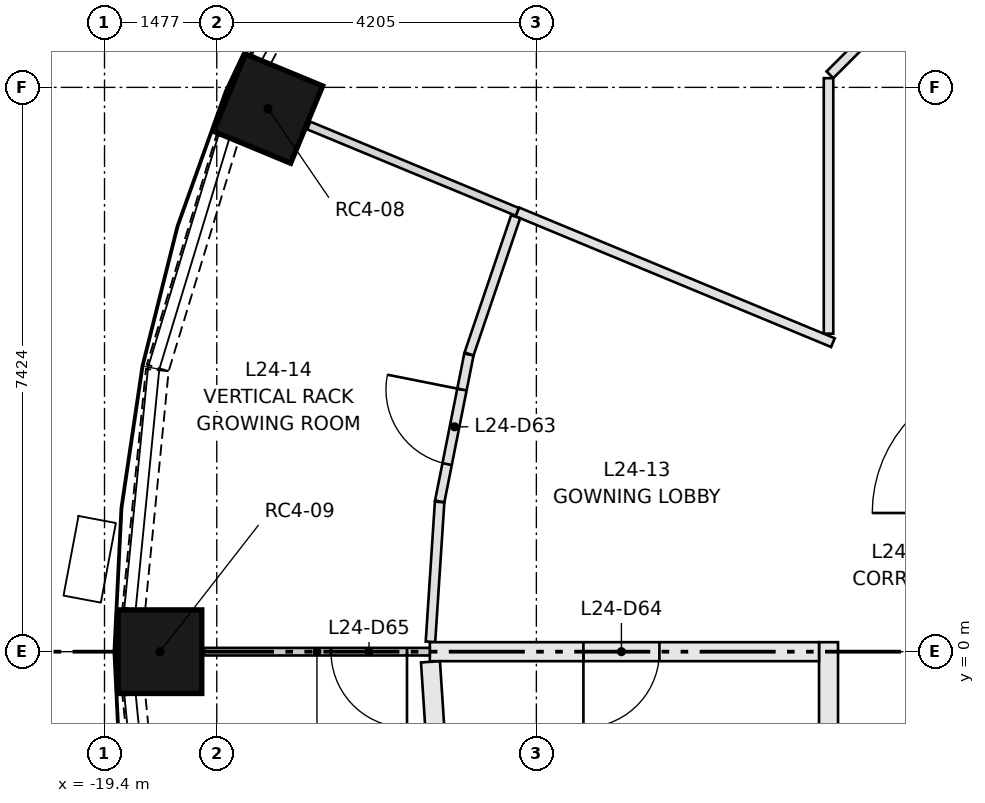
"""IFC4 building model, lengths in metres.
Left out: names, types, materials, properties, quantities, classifications, styles, units other than length and angle.
Written with IfcOpenShell. Run it as: python <this file> out.ifc"""

import sys

from ifc_helpers import new_model, si_unit, direction, frame, frame_2d, origin, origin_2d, place, context, subcontext, project, spatial, rectangle, extrude, element, fill, save


model = new_model("IFC4")
c1 = context("Model", 3, precision=1e-05, world=origin(), true_north=direction((0.0, 1.0)))
c2 = subcontext(c1, "Body", "Model", "MODEL_VIEW")
j1 = project(units=[si_unit("LENGTHUNIT", "METRE"), si_unit("PLANEANGLEUNIT", "RADIAN")], contexts=[c1])
p1 = place(None, origin())
s1 = spatial("IfcSite", under=j1, at=p1, CompositionType="ELEMENT")
p2 = place(p1, origin())
s2 = spatial("IfcBuilding", under=s1, at=p2, CompositionType="ELEMENT")
p3 = place(p2, frame((0.0, 0.0, 94.65)))
s3 = spatial("IfcBuildingStorey", under=s2, at=p3, CompositionType="ELEMENT", Elevation=94.65)
for number, where, z_axis, x_axis in (
    (1, (-17.249, 7.145, 0.0), (0.0, 0.0, 1.0), (-0.924, 0.383, 0.0)),
    (2, (-18.67, 0.0, 0.0), (0.0, 0.0, 1.0), (-1.0, 0.0, 0.0)),
):
    element("IfcColumn", number, at=place(p3, frame(where, z_axis=z_axis, x_axis=x_axis)), inside=s3, PredefinedType="COLUMN", context=c2, shape_type="SweptSolid", body=[
        extrude(rectangle(XDim=1.1, YDim=1.1, at=origin_2d()), origin(), (0.0, 0.0, 1.0), 3.65),
    ])
p4 = place(p3, frame((-15.863, 10.582, 0.0), z_axis=(0.0, 0.0, 1.0), x_axis=(-0.471238306932, -0.882005928597, 0.0)))
e3 = element("IfcWall", 3, at=p4, inside=s3, PredefinedType="SOLIDWALL", context=c2, shape_type="SweptSolid", body=[
    extrude(rectangle(XDim=3.157, YDim=0.3, at=frame_2d((1.579, 0.0))), origin(), (0.0, 0.0, 1.0), 0.9),
])
p5 = place(p3, frame((-17.782, 6.756, 0.0), z_axis=(0.0, 0.0, 1.0), x_axis=(-0.290503096001, -0.956874051907, 0.0)))
e4 = element("IfcWall", 4, at=p5, inside=s3, PredefinedType="SOLIDWALL", context=c2, shape_type="SweptSolid", body=[
    extrude(rectangle(XDim=3.157, YDim=0.3, at=frame_2d((1.579, 0.0))), origin(), (0.0, 0.0, 1.0), 0.9),
])
for number, where, z_axis, x_axis in (
    (5, (-18.706, 3.705, 0.0), (0.0, 0.0, 1.0), (-0.098, -0.995, 0.0)),
    (6, (-19.014, -0.564, 0.0), (0.0, 0.0, 1.0), (0.098, -0.995, 0.0)),
):
    element("IfcWall", number, at=place(p3, frame(where, z_axis=z_axis, x_axis=x_axis)), inside=s3, PredefinedType="SOLIDWALL", context=c2, shape_type="SweptSolid", body=[
        extrude(rectangle(XDim=3.156, YDim=0.3, at=frame_2d((1.578, 0.0))), origin(), (0.0, 0.0, 1.0), 0.9),
    ])
p6 = place(p3, frame((-9.874, 4.183, 0.0), z_axis=(0.0, 0.0, 1.0), x_axis=(0.0, 1.0, 0.0)))
e7 = element("IfcWall", 7, at=p6, inside=s3, PredefinedType="PARTITIONING", context=c2, shape_type="SweptSolid", body=[
    extrude(rectangle(XDim=3.362, YDim=0.125, at=frame_2d((1.681, 0.0))), origin(), (0.0, 0.0, 1.0), 3.3),
])
p7 = place(p3, frame((-9.856, 7.589, 0.0), z_axis=(0.0, 0.0, 1.0), x_axis=(0.70718294931, 0.707030604857, 0.0)))
e8 = element("IfcWall", 8, at=p7, inside=s3, PredefinedType="PARTITIONING", context=c2, shape_type="SweptSolid", body=[
    extrude(rectangle(XDim=1.603, YDim=0.125, at=frame_2d((0.801, 0.0))), origin(), (0.0, 0.0, 1.0), 3.3),
])
p8 = place(p3, frame((-9.874, -4.09, 0.0), z_axis=(0.0, 0.0, 1.0), x_axis=(0.0, 1.0, 0.0)))
e9 = element("IfcWall", 9, at=p8, inside=s3, PredefinedType="PARTITIONING", context=c2, shape_type="SweptSolid", body=[
    extrude(rectangle(XDim=4.215, YDim=0.25, at=frame_2d((2.107, 0.0))), origin(), (0.0, 0.0, 1.0), 3.3),
])
p9 = place(p3, frame((-9.816, 4.066, 0.0), z_axis=(0.0, 0.0, 1.0), x_axis=(-0.923867212496, 0.382713174158, 0.0)))
e10 = element("IfcWall", 10, at=p9, inside=s3, PredefinedType="PARTITIONING", context=c2, shape_type="SweptSolid", body=[
    extrude(rectangle(XDim=4.495, YDim=0.125, at=frame_2d((2.248, 0.0))), origin(), (0.0, 0.0, 1.0), 3.3),
])
p10 = place(p3, frame((-13.969, 5.786, 0.0), z_axis=(0.0, 0.0, 1.0), x_axis=(-0.923889594764, 0.382659139036, 0.0)))
e11 = element("IfcWall", 11, at=p10, inside=s3, PredefinedType="PARTITIONING", context=c2, shape_type="SweptSolid", body=[
    extrude(rectangle(XDim=2.97, YDim=0.11, at=frame_2d((1.485, 0.0))), origin(), (0.0, 0.0, 1.0), 3.3),
])
p11 = place(p3, frame((-15.112, 0.129, 0.0), z_axis=(0.0, 0.0, 1.0), x_axis=(0.065394347625, 0.997859498777, 0.0)))
e12 = element("IfcWall", 12, at=p11, inside=s3, PredefinedType="PARTITIONING", context=c2, shape_type="SweptSolid", body=[
    extrude(rectangle(XDim=1.844, YDim=0.125, at=frame_2d((0.922, 0.0))), origin(), (0.0, 0.0, 1.0), 3.3),
])
p12 = place(p3, frame((-14.99, 1.978, 0.0), z_axis=(0.0, 0.0, 1.0), x_axis=(0.194995562173, 0.980804124549, 0.0)))
e13 = element("IfcWall", 13, at=p12, inside=s3, PredefinedType="PARTITIONING", context=c2, shape_type="SweptSolid", body=[
    extrude(rectangle(XDim=1.969, YDim=0.125, at=frame_2d((0.985, 0.0))), origin(), (0.0, 0.0, 1.0), 3.3),
])
p13 = place(p12, frame((0.5, 0.0, 0.0)))
e14 = element("IfcOpeningElement", 14, at=p13, cuts=e13, PredefinedType="OPENING", context=c2, shape_type="SweptSolid", body=[
    extrude(rectangle(XDim=1.0, YDim=2.1, at=frame_2d((0.5, 1.05))), frame((0.0, 0.073, 0.0), z_axis=(0.0, -1.0, 0.0), x_axis=(1.0, 0.0, 0.0)), (0.0, 0.0, 1.0), 0.145),
])
p14 = place(p3, frame((-14.604, 3.917, 0.0), z_axis=(0.0, 0.0, 1.0), x_axis=(0.321484961169, 0.946914684511, 0.0)))
e15 = element("IfcWall", 15, at=p14, inside=s3, PredefinedType="PARTITIONING", context=c2, shape_type="SweptSolid", body=[
    extrude(rectangle(XDim=1.907, YDim=0.125, at=frame_2d((0.954, 0.0))), origin(), (0.0, 0.0, 1.0), 3.3),
])
p15 = place(p3, frame((-9.999, 0.0, 0.0), z_axis=(0.0, 0.0, 1.0), x_axis=(-1.0, 0.0, 0.0)))
e16 = element("IfcWall", 16, at=p15, inside=s3, PredefinedType="PARTITIONING", context=c2, shape_type="SweptSolid", body=[
    extrude(rectangle(XDim=5.121, YDim=0.25, at=frame_2d((2.561, 0.0))), origin(), (0.0, 0.0, 1.0), 3.3),
])
p16 = place(p15, frame((2.1, 0.0, 0.0)))
e17 = element("IfcOpeningElement", 17, at=p16, cuts=e16, PredefinedType="OPENING", context=c2, shape_type="SweptSolid", body=[
    extrude(rectangle(XDim=1.0, YDim=2.1, at=frame_2d((0.5, 1.05))), frame((0.0, 0.135, 0.0), z_axis=(0.0, -1.0, 0.0), x_axis=(1.0, 0.0, 0.0)), (0.0, 0.0, 1.0), 0.27),
])
p17 = place(p3, frame((-15.12, 0.0, 0.0), z_axis=(0.0, 0.0, 1.0), x_axis=(-1.0, 0.0, 0.0)))
e18 = element("IfcWall", 18, at=p17, inside=s3, PredefinedType="PARTITIONING", context=c2, shape_type="SweptSolid", body=[
    extrude(rectangle(XDim=2.97, YDim=0.1, at=frame_2d((1.485, 0.0))), origin(), (0.0, 0.0, 1.0), 3.3),
])
p18 = place(p17, frame((0.3, 0.0, 0.0)))
e19 = element("IfcOpeningElement", 19, at=p18, cuts=e18, PredefinedType="OPENING", context=c2, shape_type="SweptSolid", body=[
    extrude(rectangle(XDim=1.0, YDim=2.1, at=frame_2d((0.5, 1.05))), frame((0.0, 0.06, 0.0), z_axis=(0.0, -1.0, 0.0), x_axis=(1.0, 0.0, 0.0)), (0.0, 0.0, 1.0), 0.12),
])
p19 = place(p3, frame((-15.111, -0.133, 0.0), z_axis=(0.0, 0.0, 1.0), x_axis=(0.065424560105, -0.997857518354, 0.0)))
e20 = element("IfcWall", 20, at=p19, inside=s3, PredefinedType="PARTITIONING", context=c2, shape_type="SweptSolid", body=[
    extrude(rectangle(XDim=1.836, YDim=0.25, at=frame_2d((0.918, 0.0))), origin(), (0.0, 0.0, 1.0), 3.3),
])
p20 = place(p13, origin())
e21 = element("IfcDoor", 21, at=p20, inside=s3, OperationType="SINGLE_SWING_RIGHT", PredefinedType="DOOR", context=c2, shape_type="SweptSolid", body=[
    extrude(rectangle(XDim=1.0, YDim=2.1, at=frame_2d((0.5, 1.05))), frame((0.0, 0.025, 0.0), z_axis=(0.0, -1.0, 0.0), x_axis=(1.0, 0.0, 0.0)), (0.0, 0.0, 1.0), 0.05),
])
fill(e14, e21)
p21 = place(p16, origin())
e22 = element("IfcDoor", 22, at=p21, inside=s3, OperationType="SINGLE_SWING_RIGHT", PredefinedType="DOOR", context=c2, shape_type="SweptSolid", body=[
    extrude(rectangle(XDim=1.0, YDim=2.1, at=frame_2d((0.5, 1.05))), frame((0.0, 0.025, 0.0), z_axis=(0.0, -1.0, 0.0), x_axis=(1.0, 0.0, 0.0)), (0.0, 0.0, 1.0), 0.05),
])
fill(e17, e22)
p22 = place(p18, origin())
e23 = element("IfcDoor", 23, at=p22, inside=s3, OperationType="SINGLE_SWING_LEFT", PredefinedType="DOOR", context=c2, shape_type="SweptSolid", body=[
    extrude(rectangle(XDim=1.0, YDim=2.1, at=frame_2d((0.5, 1.05))), frame((0.0, 0.025, 0.0), z_axis=(0.0, -1.0, 0.0), x_axis=(1.0, 0.0, 0.0)), (0.0, 0.0, 1.0), 0.05),
])
fill(e19, e23)
save(model, sys.argv[1])
